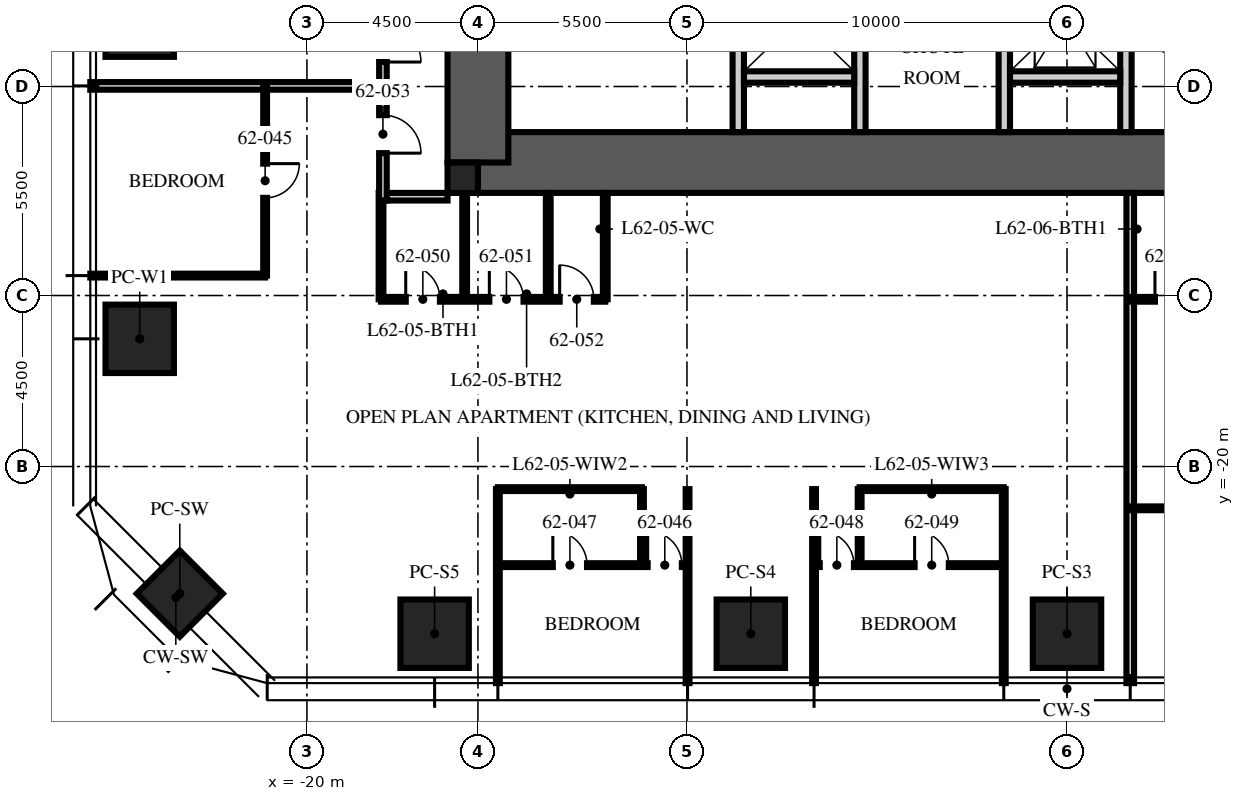
"""IFC4 building model, lengths in metres.
Left out: names, types, materials, properties, quantities, classifications, styles, units other than length and angle.
Written with IfcOpenShell. Run it as: python <this file> out.ifc"""

import sys

from ifc_helpers import new_model, si_unit, direction, frame, frame_2d, origin, origin_2d, place, context, subcontext, project, spatial, rectangle, extrude, element, fill, save


model = new_model("IFC4")
c1 = context("Model", 3, precision=1e-05, world=origin(), true_north=direction((0.0, 1.0)))
c2 = subcontext(c1, "Body", "Model", "MODEL_VIEW")
j1 = project(units=[si_unit("LENGTHUNIT", "METRE"), si_unit("PLANEANGLEUNIT", "RADIAN")], contexts=[c1])
p1 = place(None, origin())
s1 = spatial("IfcSite", under=j1, at=p1, CompositionType="ELEMENT")
p2 = place(p1, origin())
s2 = spatial("IfcBuilding", under=s1, at=p2, CompositionType="ELEMENT")
p3 = place(p2, frame((0.0, 0.0, 248.25)))
s3 = spatial("IfcBuildingStorey", under=s2, at=p3, CompositionType="ELEMENT", Elevation=248.25)
p4 = place(p3, frame((-15.5, -12.0, -0.25), z_axis=(0.0, 0.0, 1.0), x_axis=(1.0, 0.0, 0.0)))
e1 = element("IfcWall", 1, at=p4, inside=s3, PredefinedType="SHEAR", context=c2, shape_type="SweptSolid", body=[
    extrude(rectangle(XDim=31.0, YDim=1.6, at=frame_2d((15.5, 0.0))), origin(), (0.0, 0.0, 1.0), 3.75),
])
p5 = place(p3, frame((-15.5, -12.0, -0.25), z_axis=(0.0, 0.0, 1.0), x_axis=(0.0, 1.0, 0.0)))
e2 = element("IfcWall", 2, at=p5, inside=s3, PredefinedType="SHEAR", context=c2, shape_type="SweptSolid", body=[
    extrude(rectangle(XDim=24.0, YDim=1.6, at=frame_2d((12.0, 0.0))), origin(), (0.0, 0.0, 1.0), 3.75),
])
p6 = place(p5, frame((3.2, 0.0, 0.25)))
e3 = element("IfcOpeningElement", 3, at=p6, cuts=e2, PredefinedType="OPENING", context=c2, shape_type="SweptSolid", body=[
    extrude(rectangle(XDim=1.2, YDim=2.1, at=frame_2d((0.6, 1.05))), frame((0.0, 0.81, 0.0), z_axis=(0.0, -1.0, 0.0), x_axis=(1.0, 0.0, 0.0)), (0.0, 0.0, 1.0), 1.62),
])
p7 = place(p5, frame((19.3, 0.0, 0.25)))
e4 = element("IfcOpeningElement", 4, at=p7, cuts=e2, PredefinedType="OPENING", context=c2, shape_type="SweptSolid", body=[
    extrude(rectangle(XDim=1.8, YDim=2.1, at=frame_2d((0.9, 1.05))), frame((0.0, 0.81, 0.0), z_axis=(0.0, -1.0, 0.0), x_axis=(1.0, 0.0, 0.0)), (0.0, 0.0, 1.0), 1.62),
])
p8 = place(p3, frame((-15.9, -12.4, -0.25), z_axis=(0.0, 0.0, 1.0), x_axis=(1.0, 0.0, 0.0)))
e5 = element("IfcColumn", 5, at=p8, inside=s3, PredefinedType="COLUMN", context=c2, shape_type="SweptSolid", body=[
    extrude(rectangle(XDim=0.8, YDim=0.8, at=origin_2d()), origin(), (0.0, 0.0, 1.0), 3.75),
])
for number, where, z_axis, x_axis in (
    (6, (0.0, -24.4, 0.0), (0.0, 0.0, 1.0), (1.0, 0.0, 0.0)),
    (7, (-8.32, -24.4, 0.0), (0.0, 0.0, 1.0), (1.0, 0.0, 0.0)),
    (8, (-16.64, -24.4, 0.0), (0.0, 0.0, 1.0), (1.0, 0.0, 0.0)),
    (9, (-24.4, -16.64, 0.0), (0.0, 0.0, 1.0), (0.0, 1.0, 0.0)),
    (10, (-24.4, -8.32, 0.0), (0.0, 0.0, 1.0), (0.0, 1.0, 0.0)),
):
    element("IfcColumn", number, at=place(p3, frame(where, z_axis=z_axis, x_axis=x_axis)), inside=s3, PredefinedType="COLUMN", context=c2, shape_type="SweptSolid", body=[
        extrude(rectangle(XDim=1.8, YDim=1.8, at=origin_2d()), origin(), (0.0, 0.0, 1.0), 3.75),
    ])
p9 = place(p3, frame((-23.346, -23.346, 0.0), z_axis=(0.0, 0.0, 1.0), x_axis=(0.707106781187, -0.707106781187, 0.0)))
e11 = element("IfcColumn", 11, at=p9, inside=s3, PredefinedType="COLUMN", context=c2, shape_type="SweptSolid", body=[
    extrude(rectangle(XDim=1.6, YDim=1.6, at=origin_2d()), origin(), (0.0, 0.0, 1.0), 3.75),
])
p10 = place(p3, frame((-8.65, -11.2, 0.0), z_axis=(0.0, 0.0, 1.0), x_axis=(0.0, 1.0, 0.0)))
e12 = element("IfcWall", 12, at=p10, inside=s3, PredefinedType="PARTITIONING", context=c2, shape_type="SweptSolid", body=[
    extrude(rectangle(XDim=6.3, YDim=0.3, at=frame_2d((3.15, 0.0))), origin(), (0.0, 0.0, 1.0), 3.5),
])
p11 = place(p10, frame((2.45, 0.0, 0.0)))
e13 = element("IfcOpeningElement", 13, at=p11, cuts=e12, PredefinedType="OPENING", context=c2, shape_type="SweptSolid", body=[
    extrude(rectangle(XDim=1.1, YDim=2.1, at=frame_2d((0.55, 1.05))), frame((0.0, 0.16, 0.0), z_axis=(0.0, -1.0, 0.0), x_axis=(1.0, 0.0, 0.0)), (0.0, 0.0, 1.0), 0.32),
])
for number, where, z_axis, x_axis in (
    (14, (-5.45, -11.2, 0.0), (0.0, 0.0, 1.0), (0.0, 1.0, 0.0)),
    (15, (-1.65, -11.2, 0.0), (0.0, 0.0, 1.0), (0.0, 1.0, 0.0)),
    (16, (1.55, -11.2, 0.0), (0.0, 0.0, 1.0), (0.0, 1.0, 0.0)),
):
    element("IfcWall", number, at=place(p3, frame(where, z_axis=z_axis, x_axis=x_axis)), inside=s3, PredefinedType="PARTITIONING", context=c2, shape_type="SweptSolid", body=[
        extrude(rectangle(XDim=4.4, YDim=0.3, at=frame_2d((2.2, 0.0))), origin(), (0.0, 0.0, 1.0), 3.5),
    ])
for number, where, z_axis, x_axis in (
    (17, (-8.5, -9.75, 0.0), (0.0, 0.0, 1.0), (1.0, 0.0, 0.0)),
    (18, (-1.5, -9.75, 0.0), (0.0, 0.0, 1.0), (1.0, 0.0, 0.0)),
):
    element("IfcWall", number, at=place(p3, frame(where, z_axis=z_axis, x_axis=x_axis)), inside=s3, PredefinedType="PARTITIONING", context=c2, shape_type="SweptSolid", body=[
        extrude(rectangle(XDim=2.9, YDim=0.3, at=frame_2d((1.45, 0.0))), origin(), (0.0, 0.0, 1.0), 3.5),
    ])
p12 = place(p3, frame((-16.3, -12.9, 0.0), z_axis=(0.0, 0.0, 1.0), x_axis=(-1.0, 0.0, 0.0)))
e19 = element("IfcWall", 19, at=p12, inside=s3, PredefinedType="PARTITIONING", context=c2, shape_type="SweptSolid", body=[
    extrude(rectangle(XDim=1.6, YDim=0.2, at=frame_2d((0.8, 0.0))), origin(), (0.0, 0.0, 1.0), 2.3),
])
p13 = place(p3, frame((-18.1, -9.984, 0.0), z_axis=(0.0, 0.0, 1.0), x_axis=(-1.0, 0.0, 0.0)))
e20 = element("IfcWall", 20, at=p13, inside=s3, PredefinedType="PARTITIONING", context=c2, shape_type="SweptSolid", body=[
    extrude(rectangle(XDim=7.6, YDim=0.2, at=frame_2d((3.8, 0.0))), origin(), (0.0, 0.0, 1.0), 2.91),
])
p14 = place(p3, frame((-21.1, -14.976, 0.0), z_axis=(0.0, 0.0, 1.0), x_axis=(-1.0, 0.0, 0.0)))
e21 = element("IfcWall", 21, at=p14, inside=s3, PredefinedType="PARTITIONING", context=c2, shape_type="SweptSolid", body=[
    extrude(rectangle(XDim=4.6, YDim=0.1, at=frame_2d((2.3, 0.0))), origin(), (0.0, 0.0, 1.0), 2.91),
])
for number, where, z_axis, x_axis in (
    (22, (-14.976, -20.595, 0.0), (0.0, 0.0, 1.0), (0.0, -1.0, 0.0)),
    (23, (-9.984, -20.595, 0.0), (0.0, 0.0, 1.0), (0.0, -1.0, 0.0)),
    (24, (-6.656, -20.595, 0.0), (0.0, 0.0, 1.0), (0.0, -1.0, 0.0)),
    (25, (-1.664, -20.595, 0.0), (0.0, 0.0, 1.0), (0.0, -1.0, 0.0)),
):
    element("IfcWall", number, at=place(p3, frame(where, z_axis=z_axis, x_axis=x_axis)), inside=s3, PredefinedType="PARTITIONING", context=c2, shape_type="SweptSolid", body=[
        extrude(rectangle(XDim=5.105, YDim=0.1, at=frame_2d((2.552, 0.0))), origin(), (0.0, 0.0, 1.0), 2.91),
    ])
p15 = place(p3, frame((1.664, -12.8, 0.0), z_axis=(0.0, 0.0, 1.0), x_axis=(0.0, -1.0, 0.0)))
e26 = element("IfcWall", 26, at=p15, inside=s3, PredefinedType="PARTITIONING", context=c2, shape_type="SweptSolid", body=[
    extrude(rectangle(XDim=12.9, YDim=0.2, at=frame_2d((6.45, 0.0))), origin(), (0.0, 0.0, 1.0), 2.91),
])
p16 = place(p3, frame((-21.1, -9.984, 0.0), z_axis=(0.0, 0.0, 1.0), x_axis=(0.0, -1.0, 0.0)))
e27 = element("IfcWall", 27, at=p16, inside=s3, PredefinedType="PARTITIONING", context=c2, shape_type="SweptSolid", body=[
    extrude(rectangle(XDim=4.992, YDim=0.1, at=frame_2d((2.496, 0.0))), origin(), (0.0, 0.0, 1.0), 2.81),
])
p17 = place(p16, frame((2.046, 0.0, 0.0)))
e28 = element("IfcOpeningElement", 28, at=p17, cuts=e27, PredefinedType="OPENING", context=c2, shape_type="SweptSolid", body=[
    extrude(rectangle(XDim=0.9, YDim=2.1, at=frame_2d((0.45, 1.05))), frame((0.0, 0.06, 0.0), z_axis=(0.0, -1.0, 0.0), x_axis=(1.0, 0.0, 0.0)), (0.0, 0.0, 1.0), 0.12),
])
p18 = place(p3, frame((-14.976, -22.595, 0.0), z_axis=(0.0, 0.0, 1.0), x_axis=(1.0, 0.0, 0.0)))
e29 = element("IfcWall", 29, at=p18, inside=s3, PredefinedType="PARTITIONING", context=c2, shape_type="SweptSolid", body=[
    extrude(rectangle(XDim=4.992, YDim=0.1, at=frame_2d((2.496, 0.0))), origin(), (0.0, 0.0, 1.0), 2.81),
])
p19 = place(p18, frame((3.942, 0.0, 0.0)))
e30 = element("IfcOpeningElement", 30, at=p19, cuts=e29, PredefinedType="OPENING", context=c2, shape_type="SweptSolid", body=[
    extrude(rectangle(XDim=0.9, YDim=2.1, at=frame_2d((0.45, 1.05))), frame((0.0, 0.06, 0.0), z_axis=(0.0, -1.0, 0.0), x_axis=(1.0, 0.0, 0.0)), (0.0, 0.0, 1.0), 0.12),
])
p20 = place(p18, frame((1.446, 0.0, 0.0)))
e31 = element("IfcOpeningElement", 31, at=p20, cuts=e29, PredefinedType="OPENING", context=c2, shape_type="SweptSolid", body=[
    extrude(rectangle(XDim=0.9, YDim=2.1, at=frame_2d((0.45, 1.05))), frame((0.0, 0.06, 0.0), z_axis=(0.0, -1.0, 0.0), x_axis=(1.0, 0.0, 0.0)), (0.0, 0.0, 1.0), 0.12),
])
p21 = place(p3, frame((-11.184, -20.595, 0.0), z_axis=(0.0, 0.0, 1.0), x_axis=(0.0, -1.0, 0.0)))
e32 = element("IfcWall", 32, at=p21, inside=s3, PredefinedType="PARTITIONING", context=c2, shape_type="SweptSolid", body=[
    extrude(rectangle(XDim=2.0, YDim=0.1, at=frame_2d((1.0, 0.0))), origin(), (0.0, 0.0, 1.0), 3.5),
])
p22 = place(p3, frame((-14.976, -20.595, 0.0), z_axis=(0.0, 0.0, 1.0), x_axis=(1.0, 0.0, 0.0)))
e33 = element("IfcWall", 33, at=p22, inside=s3, PredefinedType="PARTITIONING", context=c2, shape_type="SweptSolid", body=[
    extrude(rectangle(XDim=3.792, YDim=0.1, at=frame_2d((1.896, 0.0))), origin(), (0.0, 0.0, 1.0), 2.81),
])
p23 = place(p3, frame((-6.656, -22.595, 0.0), z_axis=(0.0, 0.0, 1.0), x_axis=(1.0, 0.0, 0.0)))
e34 = element("IfcWall", 34, at=p23, inside=s3, PredefinedType="PARTITIONING", context=c2, shape_type="SweptSolid", body=[
    extrude(rectangle(XDim=4.992, YDim=0.1, at=frame_2d((2.496, 0.0))), origin(), (0.0, 0.0, 1.0), 2.81),
])
p24 = place(p23, frame((0.15, 0.0, 0.0)))
e35 = element("IfcOpeningElement", 35, at=p24, cuts=e34, PredefinedType="OPENING", context=c2, shape_type="SweptSolid", body=[
    extrude(rectangle(XDim=0.9, YDim=2.1, at=frame_2d((0.45, 1.05))), frame((0.0, 0.06, 0.0), z_axis=(0.0, -1.0, 0.0), x_axis=(1.0, 0.0, 0.0)), (0.0, 0.0, 1.0), 0.12),
])
p25 = place(p23, frame((2.646, 0.0, 0.0)))
e36 = element("IfcOpeningElement", 36, at=p25, cuts=e34, PredefinedType="OPENING", context=c2, shape_type="SweptSolid", body=[
    extrude(rectangle(XDim=0.9, YDim=2.1, at=frame_2d((0.45, 1.05))), frame((0.0, 0.06, 0.0), z_axis=(0.0, -1.0, 0.0), x_axis=(1.0, 0.0, 0.0)), (0.0, 0.0, 1.0), 0.12),
])
p26 = place(p3, frame((-5.456, -20.595, 0.0), z_axis=(0.0, 0.0, 1.0), x_axis=(0.0, -1.0, 0.0)))
e37 = element("IfcWall", 37, at=p26, inside=s3, PredefinedType="PARTITIONING", context=c2, shape_type="SweptSolid", body=[
    extrude(rectangle(XDim=2.0, YDim=0.1, at=frame_2d((1.0, 0.0))), origin(), (0.0, 0.0, 1.0), 3.5),
])
p27 = place(p3, frame((-5.456, -20.595, 0.0), z_axis=(0.0, 0.0, 1.0), x_axis=(1.0, 0.0, 0.0)))
e38 = element("IfcWall", 38, at=p27, inside=s3, PredefinedType="PARTITIONING", context=c2, shape_type="SweptSolid", body=[
    extrude(rectangle(XDim=3.792, YDim=0.1, at=frame_2d((1.896, 0.0))), origin(), (0.0, 0.0, 1.0), 2.81),
])
p28 = place(p3, frame((-18.05, -15.6, 0.0), z_axis=(0.0, 0.0, 1.0), x_axis=(1.0, 0.0, 0.0)))
e39 = element("IfcWall", 39, at=p28, inside=s3, PredefinedType="PARTITIONING", context=c2, shape_type="SweptSolid", body=[
    extrude(rectangle(XDim=5.9, YDim=0.125, at=frame_2d((2.95, 0.0))), origin(), (0.0, 0.0, 1.0), 2.3),
])
p29 = place(p28, frame((0.65, 0.0, 0.0)))
e40 = element("IfcOpeningElement", 40, at=p29, cuts=e39, PredefinedType="OPENING", context=c2, shape_type="SweptSolid", body=[
    extrude(rectangle(XDim=0.9, YDim=2.1, at=frame_2d((0.45, 1.05))), frame((0.0, 0.073, 0.0), z_axis=(0.0, -1.0, 0.0), x_axis=(1.0, 0.0, 0.0)), (0.0, 0.0, 1.0), 0.145),
])
p30 = place(p28, frame((2.85, 0.0, 0.0)))
e41 = element("IfcOpeningElement", 41, at=p30, cuts=e39, PredefinedType="OPENING", context=c2, shape_type="SweptSolid", body=[
    extrude(rectangle(XDim=0.9, YDim=2.1, at=frame_2d((0.45, 1.05))), frame((0.0, 0.073, 0.0), z_axis=(0.0, -1.0, 0.0), x_axis=(1.0, 0.0, 0.0)), (0.0, 0.0, 1.0), 0.145),
])
p31 = place(p28, frame((4.7, 0.0, 0.0)))
e42 = element("IfcOpeningElement", 42, at=p31, cuts=e39, PredefinedType="OPENING", context=c2, shape_type="SweptSolid", body=[
    extrude(rectangle(XDim=0.9, YDim=2.1, at=frame_2d((0.45, 1.05))), frame((0.0, 0.073, 0.0), z_axis=(0.0, -1.0, 0.0), x_axis=(1.0, 0.0, 0.0)), (0.0, 0.0, 1.0), 0.145),
])
for number, where, z_axis, x_axis in (
    (43, (-18.05, -12.8, 0.0), (0.0, 0.0, 1.0), (0.0, -1.0, 0.0)),
    (44, (-15.85, -12.8, 0.0), (0.0, 0.0, 1.0), (0.0, -1.0, 0.0)),
):
    element("IfcWall", number, at=place(p3, frame(where, z_axis=z_axis, x_axis=x_axis)), inside=s3, PredefinedType="PARTITIONING", context=c2, shape_type="SweptSolid", body=[
        extrude(rectangle(XDim=2.8, YDim=0.125, at=frame_2d((1.4, 0.0))), origin(), (0.0, 0.0, 1.0), 2.3),
    ])
for number, where, z_axis, x_axis in (
    (45, (-13.65, -12.8, 0.0), (0.0, 0.0, 1.0), (0.0, -1.0, 0.0)),
    (46, (-12.15, -12.8, 0.0), (0.0, 0.0, 1.0), (0.0, -1.0, 0.0)),
):
    element("IfcWall", number, at=place(p3, frame(where, z_axis=z_axis, x_axis=x_axis)), inside=s3, PredefinedType="PARTITIONING", context=c2, shape_type="SweptSolid", body=[
        extrude(rectangle(XDim=2.8, YDim=0.125, at=frame_2d((1.4, 0.0))), origin(), (0.0, 0.0, 1.0), 3.5),
    ])
p32 = place(p3, frame((1.664, -21.1, 0.0), z_axis=(0.0, 0.0, 1.0), x_axis=(1.0, 0.0, 0.0)))
e47 = element("IfcWall", 47, at=p32, inside=s3, PredefinedType="PARTITIONING", context=c2, shape_type="SweptSolid", body=[
    extrude(rectangle(XDim=4.992, YDim=0.1, at=frame_2d((2.496, 0.0))), origin(), (0.0, 0.0, 1.0), 2.81),
])
p33 = place(p32, frame((2.046, 0.0, 0.0)))
e48 = element("IfcOpeningElement", 48, at=p33, cuts=e47, PredefinedType="OPENING", context=c2, shape_type="SweptSolid", body=[
    extrude(rectangle(XDim=0.9, YDim=2.1, at=frame_2d((0.45, 1.05))), frame((0.0, 0.06, 0.0), z_axis=(0.0, -1.0, 0.0), x_axis=(1.0, 0.0, 0.0)), (0.0, 0.0, 1.0), 0.12),
])
p34 = place(p3, frame((1.664, -15.6, 0.0), z_axis=(0.0, 0.0, 1.0), x_axis=(1.0, 0.0, 0.0)))
e49 = element("IfcWall", 49, at=p34, inside=s3, PredefinedType="PARTITIONING", context=c2, shape_type="SweptSolid", body=[
    extrude(rectangle(XDim=3.7, YDim=0.125, at=frame_2d((1.85, 0.0))), origin(), (0.0, 0.0, 1.0), 2.81),
])
p35 = place(p34, frame((0.65, 0.0, 0.0)))
e50 = element("IfcOpeningElement", 50, at=p35, cuts=e49, PredefinedType="OPENING", context=c2, shape_type="SweptSolid", body=[
    extrude(rectangle(XDim=0.9, YDim=2.1, at=frame_2d((0.45, 1.05))), frame((0.0, 0.073, 0.0), z_axis=(0.0, -1.0, 0.0), x_axis=(1.0, 0.0, 0.0)), (0.0, 0.0, 1.0), 0.145),
])
p36 = place(p34, frame((2.5, 0.0, 0.0)))
e51 = element("IfcOpeningElement", 51, at=p36, cuts=e49, PredefinedType="OPENING", context=c2, shape_type="SweptSolid", body=[
    extrude(rectangle(XDim=0.9, YDim=2.1, at=frame_2d((0.45, 1.05))), frame((0.0, 0.073, 0.0), z_axis=(0.0, -1.0, 0.0), x_axis=(1.0, 0.0, 0.0)), (0.0, 0.0, 1.0), 0.145),
])
p37 = place(p3, frame((-18.0, 12.8, 0.0), z_axis=(0.0, 0.0, 1.0), x_axis=(0.0, -1.0, 0.0)))
e52 = element("IfcWall", 52, at=p37, inside=s3, PredefinedType="PARTITIONING", context=c2, shape_type="SweptSolid", body=[
    extrude(rectangle(XDim=25.8, YDim=0.2, at=frame_2d((12.9, 0.0))), origin(), (0.0, 0.0, 1.0), 2.6),
])
p38 = place(p37, frame((9.4, 0.0, 0.0)))
e53 = element("IfcOpeningElement", 53, at=p38, cuts=e52, PredefinedType="OPENING", context=c2, shape_type="SweptSolid", body=[
    extrude(rectangle(XDim=1.0, YDim=2.2, at=frame_2d((0.5, 1.1))), frame((0.0, 0.11, 0.0), z_axis=(0.0, -1.0, 0.0), x_axis=(1.0, 0.0, 0.0)), (0.0, 0.0, 1.0), 0.22),
])
p39 = place(p37, frame((21.156, 0.0, 0.0)))
e54 = element("IfcOpeningElement", 54, at=p39, cuts=e52, PredefinedType="OPENING", context=c2, shape_type="SweptSolid", body=[
    extrude(rectangle(XDim=1.0, YDim=2.2, at=frame_2d((0.5, 1.1))), frame((0.0, 0.11, 0.0), z_axis=(0.0, -1.0, 0.0), x_axis=(1.0, 0.0, 0.0)), (0.0, 0.0, 1.0), 0.22),
])
p40 = place(p37, frame((23.554, 0.0, 0.0)))
e55 = element("IfcOpeningElement", 55, at=p40, cuts=e52, PredefinedType="OPENING", context=c2, shape_type="SweptSolid", body=[
    extrude(rectangle(XDim=1.0, YDim=2.2, at=frame_2d((0.5, 1.1))), frame((0.0, 0.11, 0.0), z_axis=(0.0, -1.0, 0.0), x_axis=(1.0, 0.0, 0.0)), (0.0, 0.0, 1.0), 0.22),
])
p41 = place(p39, origin())
e56 = element("IfcDoor", 56, at=p41, inside=s3, OperationType="SINGLE_SWING_RIGHT", PredefinedType="DOOR", context=c2, shape_type="SweptSolid", body=[
    extrude(rectangle(XDim=1.0, YDim=2.2, at=frame_2d((0.5, 1.1))), frame((0.0, 0.025, 0.0), z_axis=(0.0, -1.0, 0.0), x_axis=(1.0, 0.0, 0.0)), (0.0, 0.0, 1.0), 0.05),
])
fill(e54, e56)
p42 = place(p17, origin())
e57 = element("IfcDoor", 57, at=p42, inside=s3, OperationType="SINGLE_SWING_LEFT", PredefinedType="DOOR", context=c2, shape_type="SweptSolid", body=[
    extrude(rectangle(XDim=0.9, YDim=2.1, at=frame_2d((0.45, 1.05))), frame((0.0, 0.025, 0.0), z_axis=(0.0, -1.0, 0.0), x_axis=(1.0, 0.0, 0.0)), (0.0, 0.0, 1.0), 0.05),
])
fill(e28, e57)
p43 = place(p19, origin())
e58 = element("IfcDoor", 58, at=p43, inside=s3, OperationType="SINGLE_SWING_LEFT", PredefinedType="DOOR", context=c2, shape_type="SweptSolid", body=[
    extrude(rectangle(XDim=0.9, YDim=2.1, at=frame_2d((0.45, 1.05))), frame((0.0, 0.025, 0.0), z_axis=(0.0, -1.0, 0.0), x_axis=(1.0, 0.0, 0.0)), (0.0, 0.0, 1.0), 0.05),
])
fill(e30, e58)
p44 = place(p20, origin())
e59 = element("IfcDoor", 59, at=p44, inside=s3, OperationType="SINGLE_SWING_LEFT", PredefinedType="DOOR", context=c2, shape_type="SweptSolid", body=[
    extrude(rectangle(XDim=0.9, YDim=2.1, at=frame_2d((0.45, 1.05))), frame((0.0, 0.025, 0.0), z_axis=(0.0, -1.0, 0.0), x_axis=(1.0, 0.0, 0.0)), (0.0, 0.0, 1.0), 0.05),
])
fill(e31, e59)
p45 = place(p24, origin())
e60 = element("IfcDoor", 60, at=p45, inside=s3, OperationType="SINGLE_SWING_LEFT", PredefinedType="DOOR", context=c2, shape_type="SweptSolid", body=[
    extrude(rectangle(XDim=0.9, YDim=2.1, at=frame_2d((0.45, 1.05))), frame((0.0, 0.025, 0.0), z_axis=(0.0, -1.0, 0.0), x_axis=(1.0, 0.0, 0.0)), (0.0, 0.0, 1.0), 0.05),
])
fill(e35, e60)
p46 = place(p25, origin())
e61 = element("IfcDoor", 61, at=p46, inside=s3, OperationType="SINGLE_SWING_LEFT", PredefinedType="DOOR", context=c2, shape_type="SweptSolid", body=[
    extrude(rectangle(XDim=0.9, YDim=2.1, at=frame_2d((0.45, 1.05))), frame((0.0, 0.025, 0.0), z_axis=(0.0, -1.0, 0.0), x_axis=(1.0, 0.0, 0.0)), (0.0, 0.0, 1.0), 0.05),
])
fill(e36, e61)
p47 = place(p29, origin())
e62 = element("IfcDoor", 62, at=p47, inside=s3, OperationType="SINGLE_SWING_LEFT", PredefinedType="DOOR", context=c2, shape_type="SweptSolid", body=[
    extrude(rectangle(XDim=0.9, YDim=2.1, at=frame_2d((0.45, 1.05))), frame((0.0, 0.025, 0.0), z_axis=(0.0, -1.0, 0.0), x_axis=(1.0, 0.0, 0.0)), (0.0, 0.0, 1.0), 0.05),
])
fill(e40, e62)
p48 = place(p30, origin())
e63 = element("IfcDoor", 63, at=p48, inside=s3, OperationType="SINGLE_SWING_LEFT", PredefinedType="DOOR", context=c2, shape_type="SweptSolid", body=[
    extrude(rectangle(XDim=0.9, YDim=2.1, at=frame_2d((0.45, 1.05))), frame((0.0, 0.025, 0.0), z_axis=(0.0, -1.0, 0.0), x_axis=(1.0, 0.0, 0.0)), (0.0, 0.0, 1.0), 0.05),
])
fill(e41, e63)
p49 = place(p31, origin())
e64 = element("IfcDoor", 64, at=p49, inside=s3, OperationType="SINGLE_SWING_LEFT", PredefinedType="DOOR", context=c2, shape_type="SweptSolid", body=[
    extrude(rectangle(XDim=0.9, YDim=2.1, at=frame_2d((0.45, 1.05))), frame((0.0, 0.025, 0.0), z_axis=(0.0, -1.0, 0.0), x_axis=(1.0, 0.0, 0.0)), (0.0, 0.0, 1.0), 0.05),
])
fill(e42, e64)
p50 = place(p40, origin())
e65 = element("IfcDoor", 65, at=p50, inside=s3, OperationType="SINGLE_SWING_RIGHT", PredefinedType="DOOR", context=c2, shape_type="SweptSolid", body=[
    extrude(rectangle(XDim=1.0, YDim=2.2, at=frame_2d((0.5, 1.1))), frame((0.0, 0.025, 0.0), z_axis=(0.0, -1.0, 0.0), x_axis=(1.0, 0.0, 0.0)), (0.0, 0.0, 1.0), 0.05),
])
fill(e55, e65)
p51 = place(p35, origin())
e66 = element("IfcDoor", 66, at=p51, inside=s3, OperationType="SINGLE_SWING_LEFT", PredefinedType="DOOR", context=c2, shape_type="SweptSolid", body=[
    extrude(rectangle(XDim=0.9, YDim=2.1, at=frame_2d((0.45, 1.05))), frame((0.0, 0.025, 0.0), z_axis=(0.0, -1.0, 0.0), x_axis=(1.0, 0.0, 0.0)), (0.0, 0.0, 1.0), 0.05),
])
fill(e50, e66)
save(model, sys.argv[1])
